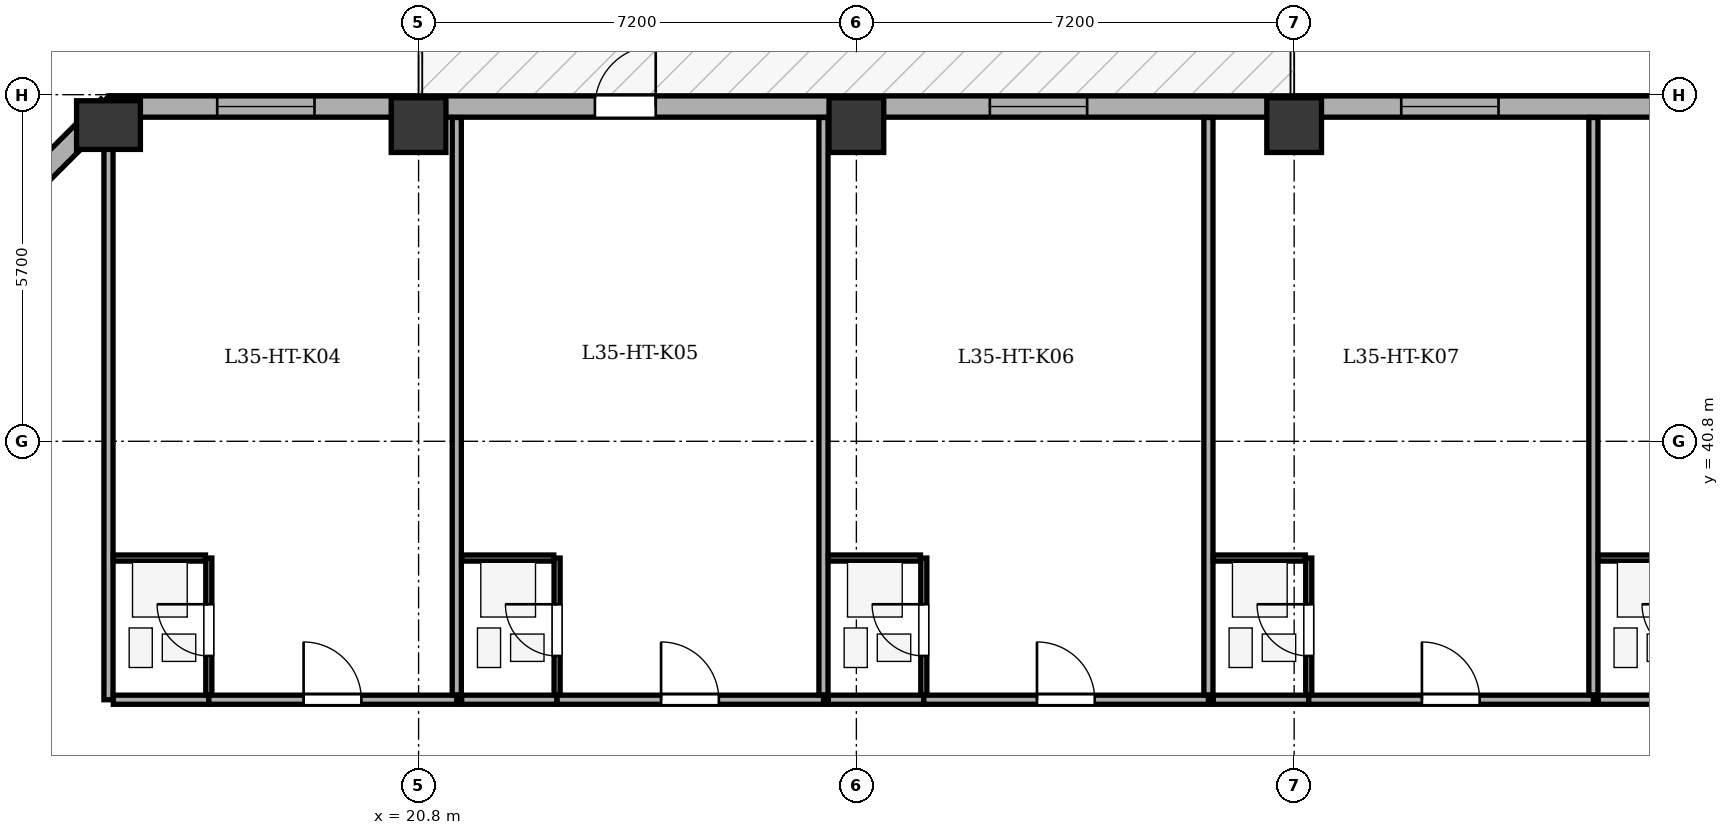
"""IFC4 building model, lengths in metres.
Left out: names, types, materials, properties, quantities, classifications, styles, units other than length and angle.
Written with IfcOpenShell. Run it as: python <this file> out.ifc"""

import sys

from ifc_helpers import new_model, si_unit, direction, frame, frame_2d, origin, origin_2d, place, context, subcontext, project, spatial, rectangle, extrude, element, fill, save


model = new_model("IFC4")
c1 = context("Model", 3, precision=1e-05, world=origin(), true_north=direction((0.0, 1.0)))
c2 = subcontext(c1, "Body", "Model", "MODEL_VIEW")
j1 = project(units=[si_unit("LENGTHUNIT", "METRE"), si_unit("PLANEANGLEUNIT", "RADIAN")], contexts=[c1])
p1 = place(None, origin())
s1 = spatial("IfcSite", under=j1, at=p1, CompositionType="ELEMENT")
p2 = place(p1, origin())
s2 = spatial("IfcBuilding", under=s1, at=p2, CompositionType="ELEMENT")
p3 = place(p2, frame((0.0, 0.0, 141.3)))
s3 = spatial("IfcBuildingStorey", under=s2, at=p3, CompositionType="ELEMENT", Elevation=141.3)
p4 = place(p3, frame((15.7, 46.0, 0.0), z_axis=(0.0, 0.0, 1.0), x_axis=(1.0, 0.0, 0.0)))
e1 = element("IfcColumn", 1, at=p4, inside=s3, PredefinedType="COLUMN", context=c2, shape_type="SweptSolid", body=[
    extrude(rectangle(XDim=0.8, YDim=1.05, at=origin_2d()), origin(), (0.0, 0.0, 1.0), 3.5),
])
for number, where, z_axis, x_axis in (
    (2, (20.8, 46.0, 0.0), (0.0, 0.0, 1.0), (1.0, 0.0, 0.0)),
    (3, (28.0, 46.0, 0.0), (0.0, 0.0, 1.0), (1.0, 0.0, 0.0)),
    (4, (35.2, 46.0, 0.0), (0.0, 0.0, 1.0), (1.0, 0.0, 0.0)),
):
    element("IfcColumn", number, at=place(p3, frame(where, z_axis=z_axis, x_axis=x_axis)), inside=s3, PredefinedType="COLUMN", context=c2, shape_type="SweptSolid", body=[
        extrude(rectangle(XDim=0.9, YDim=0.9, at=origin_2d()), origin(), (0.0, 0.0, 1.0), 3.5),
    ])
p5 = place(p3, frame((10.895, 41.5, 0.0), z_axis=(0.0, 0.0, 1.0), x_axis=(0.707106781187, 0.707106781187, 0.0)))
e5 = element("IfcWall", 5, at=p5, inside=s3, PredefinedType="STANDARD", context=c2, shape_type="SweptSolid", body=[
    extrude(rectangle(XDim=6.795, YDim=0.35, at=frame_2d((3.397, 0.0))), origin(), (0.0, 0.0, 1.0), 2.785),
])
p6 = place(p5, frame((2.698, 0.0, 0.75)))
e6 = element("IfcOpeningElement", 6, at=p6, cuts=e5, PredefinedType="OPENING", context=c2, shape_type="SweptSolid", body=[
    extrude(rectangle(XDim=1.4, YDim=1.65, at=frame_2d((0.7, 0.825))), frame((0.0, 0.185, 0.0), z_axis=(0.0, -1.0, 0.0), x_axis=(1.0, 0.0, 0.0)), (0.0, 0.0, 1.0), 0.37),
])
p7 = place(p3, frame((15.7, 46.305, 0.0), z_axis=(0.0, 0.0, 1.0), x_axis=(1.0, 0.0, 0.0)))
e7 = element("IfcWall", 7, at=p7, inside=s3, PredefinedType="STANDARD", context=c2, shape_type="SweptSolid", body=[
    extrude(rectangle(XDim=35.0, YDim=0.35, at=frame_2d((17.5, 0.0))), origin(), (0.0, 0.0, 1.0), 2.785),
])
p8 = place(p7, frame((8.0, 0.0, 0.0)))
e8 = element("IfcOpeningElement", 8, at=p8, cuts=e7, PredefinedType="OPENING", context=c2, shape_type="SweptSolid", body=[
    extrude(rectangle(XDim=1.0, YDim=2.02, at=frame_2d((0.5, 1.01))), frame((0.0, 0.185, 0.0), z_axis=(0.0, -1.0, 0.0), x_axis=(1.0, 0.0, 0.0)), (0.0, 0.0, 1.0), 0.37),
])
p9 = place(p7, frame((1.788, 0.0, 0.75)))
e9 = element("IfcOpeningElement", 9, at=p9, cuts=e7, PredefinedType="OPENING", context=c2, shape_type="SweptSolid", body=[
    extrude(rectangle(XDim=1.6, YDim=1.75, at=frame_2d((0.8, 0.875))), frame((0.0, 0.185, 0.0), z_axis=(0.0, -1.0, 0.0), x_axis=(1.0, 0.0, 0.0)), (0.0, 0.0, 1.0), 0.37),
])
p10 = place(p7, frame((14.495, 0.0, 0.75)))
e10 = element("IfcOpeningElement", 10, at=p10, cuts=e7, PredefinedType="OPENING", context=c2, shape_type="SweptSolid", body=[
    extrude(rectangle(XDim=1.6, YDim=1.75, at=frame_2d((0.8, 0.875))), frame((0.0, 0.185, 0.0), z_axis=(0.0, -1.0, 0.0), x_axis=(1.0, 0.0, 0.0)), (0.0, 0.0, 1.0), 0.37),
])
p11 = place(p7, frame((21.261, 0.0, 0.75)))
e11 = element("IfcOpeningElement", 11, at=p11, cuts=e7, PredefinedType="OPENING", context=c2, shape_type="SweptSolid", body=[
    extrude(rectangle(XDim=1.6, YDim=1.75, at=frame_2d((0.8, 0.875))), frame((0.0, 0.185, 0.0), z_axis=(0.0, -1.0, 0.0), x_axis=(1.0, 0.0, 0.0)), (0.0, 0.0, 1.0), 0.37),
])
p12 = place(p7, frame((26.486, 0.0, 0.75)))
e12 = element("IfcOpeningElement", 12, at=p12, cuts=e7, PredefinedType="OPENING", context=c2, shape_type="SweptSolid", body=[
    extrude(rectangle(XDim=1.6, YDim=1.75, at=frame_2d((0.8, 0.875))), frame((0.0, 0.185, 0.0), z_axis=(0.0, -1.0, 0.0), x_axis=(1.0, 0.0, 0.0)), (0.0, 0.0, 1.0), 0.37),
])
p13 = place(p7, frame((31.637, 0.0, 0.75)))
e13 = element("IfcOpeningElement", 13, at=p13, cuts=e7, PredefinedType="OPENING", context=c2, shape_type="SweptSolid", body=[
    extrude(rectangle(XDim=1.6, YDim=1.75, at=frame_2d((0.8, 0.875))), frame((0.0, 0.185, 0.0), z_axis=(0.0, -1.0, 0.0), x_axis=(1.0, 0.0, 0.0)), (0.0, 0.0, 1.0), 0.37),
])
p14 = place(p3, frame((15.7, 36.55, 0.0), z_axis=(0.0, 0.0, 1.0), x_axis=(0.0, 1.0, 0.0)))
e14 = element("IfcWall", 14, at=p14, inside=s3, PredefinedType="PARTITIONING", context=c2, shape_type="SweptSolid", body=[
    extrude(rectangle(XDim=9.575, YDim=0.15, at=frame_2d((4.788, 0.0))), origin(), (0.0, 0.0, 1.0), 3.2),
])
p15 = place(p3, frame((15.78, 36.55, 0.0), z_axis=(0.0, 0.0, 1.0), x_axis=(1.0, 0.0, 0.0)))
e15 = element("IfcWall", 15, at=p15, inside=s3, PredefinedType="PARTITIONING", context=c2, shape_type="SweptSolid", body=[
    extrude(rectangle(XDim=1.57, YDim=0.15, at=frame_2d((0.785, 0.0))), origin(), (0.0, 0.0, 1.0), 3.2),
])
p16 = place(p3, frame((17.35, 36.55, 0.0), z_axis=(0.0, 0.0, 1.0), x_axis=(1.0, 0.0, 0.0)))
e16 = element("IfcWall", 16, at=p16, inside=s3, PredefinedType="PARTITIONING", context=c2, shape_type="SweptSolid", body=[
    extrude(rectangle(XDim=4.078, YDim=0.15, at=frame_2d((2.039, 0.0))), origin(), (0.0, 0.0, 1.0), 3.2),
])
p17 = place(p16, frame((1.559, 0.0, 0.0)))
e17 = element("IfcOpeningElement", 17, at=p17, cuts=e16, PredefinedType="OPENING", context=c2, shape_type="SweptSolid", body=[
    extrude(rectangle(XDim=0.95, YDim=2.1, at=frame_2d((0.475, 1.05))), frame((0.0, 0.085, 0.0), z_axis=(0.0, -1.0, 0.0), x_axis=(1.0, 0.0, 0.0)), (0.0, 0.0, 1.0), 0.17),
])
p18 = place(p3, frame((17.35, 36.63, 0.0), z_axis=(0.0, 0.0, 1.0), x_axis=(0.0, 1.0, 0.0)))
e18 = element("IfcWall", 18, at=p18, inside=s3, PredefinedType="PARTITIONING", context=c2, shape_type="SweptSolid", body=[
    extrude(rectangle(XDim=2.25, YDim=0.1, at=frame_2d((1.125, 0.0))), origin(), (0.0, 0.0, 1.0), 3.2),
])
p19 = place(p18, frame((0.64, 0.0, 0.0)))
e19 = element("IfcOpeningElement", 19, at=p19, cuts=e18, PredefinedType="OPENING", context=c2, shape_type="SweptSolid", body=[
    extrude(rectangle(XDim=0.85, YDim=2.05, at=frame_2d((0.425, 1.025))), frame((0.0, 0.06, 0.0), z_axis=(0.0, -1.0, 0.0), x_axis=(1.0, 0.0, 0.0)), (0.0, 0.0, 1.0), 0.12),
])
p20 = place(p3, frame((15.78, 38.88, 0.0), z_axis=(0.0, 0.0, 1.0), x_axis=(1.0, 0.0, 0.0)))
e20 = element("IfcWall", 20, at=p20, inside=s3, PredefinedType="PARTITIONING", context=c2, shape_type="SweptSolid", body=[
    extrude(rectangle(XDim=1.515, YDim=0.1, at=frame_2d((0.757, 0.0))), origin(), (0.0, 0.0, 1.0), 3.2),
])
p21 = place(p3, frame((21.428, 36.63, 0.0), z_axis=(0.0, 0.0, 1.0), x_axis=(0.0, 1.0, 0.0)))
e21 = element("IfcWall", 21, at=p21, inside=s3, PredefinedType="PARTITIONING", context=c2, shape_type="SweptSolid", body=[
    extrude(rectangle(XDim=9.495, YDim=0.15, at=frame_2d((4.748, 0.0))), origin(), (0.0, 0.0, 1.0), 3.2),
])
p22 = place(p3, frame((21.508, 36.55, 0.0), z_axis=(0.0, 0.0, 1.0), x_axis=(1.0, 0.0, 0.0)))
e22 = element("IfcWall", 22, at=p22, inside=s3, PredefinedType="PARTITIONING", context=c2, shape_type="SweptSolid", body=[
    extrude(rectangle(XDim=1.57, YDim=0.15, at=frame_2d((0.785, 0.0))), origin(), (0.0, 0.0, 1.0), 3.2),
])
p23 = place(p3, frame((23.078, 36.55, 0.0), z_axis=(0.0, 0.0, 1.0), x_axis=(1.0, 0.0, 0.0)))
e23 = element("IfcWall", 23, at=p23, inside=s3, PredefinedType="PARTITIONING", context=c2, shape_type="SweptSolid", body=[
    extrude(rectangle(XDim=4.381, YDim=0.15, at=frame_2d((2.19, 0.0))), origin(), (0.0, 0.0, 1.0), 3.2),
])
p24 = place(p23, frame((1.71, 0.0, 0.0)))
e24 = element("IfcOpeningElement", 24, at=p24, cuts=e23, PredefinedType="OPENING", context=c2, shape_type="SweptSolid", body=[
    extrude(rectangle(XDim=0.95, YDim=2.1, at=frame_2d((0.475, 1.05))), frame((0.0, 0.085, 0.0), z_axis=(0.0, -1.0, 0.0), x_axis=(1.0, 0.0, 0.0)), (0.0, 0.0, 1.0), 0.17),
])
p25 = place(p3, frame((23.078, 36.63, 0.0), z_axis=(0.0, 0.0, 1.0), x_axis=(0.0, 1.0, 0.0)))
e25 = element("IfcWall", 25, at=p25, inside=s3, PredefinedType="PARTITIONING", context=c2, shape_type="SweptSolid", body=[
    extrude(rectangle(XDim=2.25, YDim=0.1, at=frame_2d((1.125, 0.0))), origin(), (0.0, 0.0, 1.0), 3.2),
])
p26 = place(p25, frame((0.64, 0.0, 0.0)))
e26 = element("IfcOpeningElement", 26, at=p26, cuts=e25, PredefinedType="OPENING", context=c2, shape_type="SweptSolid", body=[
    extrude(rectangle(XDim=0.85, YDim=2.05, at=frame_2d((0.425, 1.025))), frame((0.0, 0.06, 0.0), z_axis=(0.0, -1.0, 0.0), x_axis=(1.0, 0.0, 0.0)), (0.0, 0.0, 1.0), 0.12),
])
p27 = place(p3, frame((21.508, 38.88, 0.0), z_axis=(0.0, 0.0, 1.0), x_axis=(1.0, 0.0, 0.0)))
e27 = element("IfcWall", 27, at=p27, inside=s3, PredefinedType="PARTITIONING", context=c2, shape_type="SweptSolid", body=[
    extrude(rectangle(XDim=1.515, YDim=0.1, at=frame_2d((0.757, 0.0))), origin(), (0.0, 0.0, 1.0), 3.2),
])
p28 = place(p3, frame((27.459, 36.63, 0.0), z_axis=(0.0, 0.0, 1.0), x_axis=(0.0, 1.0, 0.0)))
e28 = element("IfcWall", 28, at=p28, inside=s3, PredefinedType="PARTITIONING", context=c2, shape_type="SweptSolid", body=[
    extrude(rectangle(XDim=9.495, YDim=0.15, at=frame_2d((4.748, 0.0))), origin(), (0.0, 0.0, 1.0), 3.2),
])
p29 = place(p3, frame((27.539, 36.55, 0.0), z_axis=(0.0, 0.0, 1.0), x_axis=(1.0, 0.0, 0.0)))
e29 = element("IfcWall", 29, at=p29, inside=s3, PredefinedType="PARTITIONING", context=c2, shape_type="SweptSolid", body=[
    extrude(rectangle(XDim=1.57, YDim=0.15, at=frame_2d((0.785, 0.0))), origin(), (0.0, 0.0, 1.0), 3.2),
])
p30 = place(p3, frame((29.109, 36.55, 0.0), z_axis=(0.0, 0.0, 1.0), x_axis=(1.0, 0.0, 0.0)))
e30 = element("IfcWall", 30, at=p30, inside=s3, PredefinedType="PARTITIONING", context=c2, shape_type="SweptSolid", body=[
    extrude(rectangle(XDim=4.681, YDim=0.15, at=frame_2d((2.341, 0.0))), origin(), (0.0, 0.0, 1.0), 3.2),
])
p31 = place(p30, frame((1.861, 0.0, 0.0)))
e31 = element("IfcOpeningElement", 31, at=p31, cuts=e30, PredefinedType="OPENING", context=c2, shape_type="SweptSolid", body=[
    extrude(rectangle(XDim=0.95, YDim=2.1, at=frame_2d((0.475, 1.05))), frame((0.0, 0.085, 0.0), z_axis=(0.0, -1.0, 0.0), x_axis=(1.0, 0.0, 0.0)), (0.0, 0.0, 1.0), 0.17),
])
p32 = place(p3, frame((29.109, 36.63, 0.0), z_axis=(0.0, 0.0, 1.0), x_axis=(0.0, 1.0, 0.0)))
e32 = element("IfcWall", 32, at=p32, inside=s3, PredefinedType="PARTITIONING", context=c2, shape_type="SweptSolid", body=[
    extrude(rectangle(XDim=2.25, YDim=0.1, at=frame_2d((1.125, 0.0))), origin(), (0.0, 0.0, 1.0), 3.2),
])
p33 = place(p32, frame((0.64, 0.0, 0.0)))
e33 = element("IfcOpeningElement", 33, at=p33, cuts=e32, PredefinedType="OPENING", context=c2, shape_type="SweptSolid", body=[
    extrude(rectangle(XDim=0.85, YDim=2.05, at=frame_2d((0.425, 1.025))), frame((0.0, 0.06, 0.0), z_axis=(0.0, -1.0, 0.0), x_axis=(1.0, 0.0, 0.0)), (0.0, 0.0, 1.0), 0.12),
])
p34 = place(p3, frame((27.539, 38.88, 0.0), z_axis=(0.0, 0.0, 1.0), x_axis=(1.0, 0.0, 0.0)))
e34 = element("IfcWall", 34, at=p34, inside=s3, PredefinedType="PARTITIONING", context=c2, shape_type="SweptSolid", body=[
    extrude(rectangle(XDim=1.515, YDim=0.1, at=frame_2d((0.757, 0.0))), origin(), (0.0, 0.0, 1.0), 3.2),
])
p35 = place(p3, frame((33.79, 36.63, 0.0), z_axis=(0.0, 0.0, 1.0), x_axis=(0.0, 1.0, 0.0)))
e35 = element("IfcWall", 35, at=p35, inside=s3, PredefinedType="PARTITIONING", context=c2, shape_type="SweptSolid", body=[
    extrude(rectangle(XDim=9.495, YDim=0.15, at=frame_2d((4.748, 0.0))), origin(), (0.0, 0.0, 1.0), 2.785),
])
p36 = place(p3, frame((33.87, 36.55, 0.0), z_axis=(0.0, 0.0, 1.0), x_axis=(1.0, 0.0, 0.0)))
e36 = element("IfcWall", 36, at=p36, inside=s3, PredefinedType="PARTITIONING", context=c2, shape_type="SweptSolid", body=[
    extrude(rectangle(XDim=1.57, YDim=0.15, at=frame_2d((0.785, 0.0))), origin(), (0.0, 0.0, 1.0), 3.2),
])
p37 = place(p3, frame((35.44, 36.55, 0.0), z_axis=(0.0, 0.0, 1.0), x_axis=(1.0, 0.0, 0.0)))
e37 = element("IfcWall", 37, at=p37, inside=s3, PredefinedType="PARTITIONING", context=c2, shape_type="SweptSolid", body=[
    extrude(rectangle(XDim=4.681, YDim=0.15, at=frame_2d((2.341, 0.0))), origin(), (0.0, 0.0, 1.0), 3.2),
])
p38 = place(p37, frame((1.861, 0.0, 0.0)))
e38 = element("IfcOpeningElement", 38, at=p38, cuts=e37, PredefinedType="OPENING", context=c2, shape_type="SweptSolid", body=[
    extrude(rectangle(XDim=0.95, YDim=2.1, at=frame_2d((0.475, 1.05))), frame((0.0, 0.085, 0.0), z_axis=(0.0, -1.0, 0.0), x_axis=(1.0, 0.0, 0.0)), (0.0, 0.0, 1.0), 0.17),
])
p39 = place(p3, frame((35.44, 36.63, 0.0), z_axis=(0.0, 0.0, 1.0), x_axis=(0.0, 1.0, 0.0)))
e39 = element("IfcWall", 39, at=p39, inside=s3, PredefinedType="PARTITIONING", context=c2, shape_type="SweptSolid", body=[
    extrude(rectangle(XDim=2.25, YDim=0.1, at=frame_2d((1.125, 0.0))), origin(), (0.0, 0.0, 1.0), 2.535),
])
p40 = place(p39, frame((0.64, 0.0, 0.0)))
e40 = element("IfcOpeningElement", 40, at=p40, cuts=e39, PredefinedType="OPENING", context=c2, shape_type="SweptSolid", body=[
    extrude(rectangle(XDim=0.85, YDim=2.05, at=frame_2d((0.425, 1.025))), frame((0.0, 0.06, 0.0), z_axis=(0.0, -1.0, 0.0), x_axis=(1.0, 0.0, 0.0)), (0.0, 0.0, 1.0), 0.12),
])
p41 = place(p3, frame((33.87, 38.88, 0.0), z_axis=(0.0, 0.0, 1.0), x_axis=(1.0, 0.0, 0.0)))
e41 = element("IfcWall", 41, at=p41, inside=s3, PredefinedType="PARTITIONING", context=c2, shape_type="SweptSolid", body=[
    extrude(rectangle(XDim=1.515, YDim=0.1, at=frame_2d((0.757, 0.0))), origin(), (0.0, 0.0, 1.0), 3.2),
])
p42 = place(p3, frame((40.121, 36.63, 0.0), z_axis=(0.0, 0.0, 1.0), x_axis=(0.0, 1.0, 0.0)))
e42 = element("IfcWall", 42, at=p42, inside=s3, PredefinedType="PARTITIONING", context=c2, shape_type="SweptSolid", body=[
    extrude(rectangle(XDim=9.495, YDim=0.15, at=frame_2d((4.748, 0.0))), origin(), (0.0, 0.0, 1.0), 3.2),
])
p43 = place(p3, frame((40.201, 36.55, 0.0), z_axis=(0.0, 0.0, 1.0), x_axis=(1.0, 0.0, 0.0)))
e43 = element("IfcWall", 43, at=p43, inside=s3, PredefinedType="PARTITIONING", context=c2, shape_type="SweptSolid", body=[
    extrude(rectangle(XDim=1.57, YDim=0.15, at=frame_2d((0.785, 0.0))), origin(), (0.0, 0.0, 1.0), 3.2),
])
p44 = place(p3, frame((40.201, 38.88, 0.0), z_axis=(0.0, 0.0, 1.0), x_axis=(1.0, 0.0, 0.0)))
e44 = element("IfcWall", 44, at=p44, inside=s3, PredefinedType="PARTITIONING", context=c2, shape_type="SweptSolid", body=[
    extrude(rectangle(XDim=1.515, YDim=0.1, at=frame_2d((0.758, 0.0))), origin(), (0.0, 0.0, 1.0), 3.2),
])
p45 = place(p8, origin())
e45 = element("IfcDoor", 45, at=p45, inside=s3, OperationType="SINGLE_SWING_RIGHT", PredefinedType="DOOR", context=c2, shape_type="SweptSolid", body=[
    extrude(rectangle(XDim=1.0, YDim=2.02, at=frame_2d((0.5, 1.01))), frame((0.0, 0.025, 0.0), z_axis=(0.0, -1.0, 0.0), x_axis=(1.0, 0.0, 0.0)), (0.0, 0.0, 1.0), 0.05),
])
fill(e8, e45)
p46 = place(p9, origin())
e46 = element("IfcWindow", 46, at=p46, inside=s3, PartitioningType="SINGLE_PANEL", PredefinedType="WINDOW", context=c2, shape_type="SweptSolid", body=[
    extrude(rectangle(XDim=1.6, YDim=1.75, at=frame_2d((0.8, 0.875))), frame((0.0, -0.01, 0.0), z_axis=(0.0, -1.0, 0.0), x_axis=(1.0, 0.0, 0.0)), (0.0, 0.0, 1.0), 0.06),
])
fill(e9, e46)
p47 = place(p10, origin())
e47 = element("IfcWindow", 47, at=p47, inside=s3, PartitioningType="SINGLE_PANEL", PredefinedType="WINDOW", context=c2, shape_type="SweptSolid", body=[
    extrude(rectangle(XDim=1.6, YDim=1.75, at=frame_2d((0.8, 0.875))), frame((0.0, -0.01, 0.0), z_axis=(0.0, -1.0, 0.0), x_axis=(1.0, 0.0, 0.0)), (0.0, 0.0, 1.0), 0.06),
])
fill(e10, e47)
p48 = place(p11, origin())
e48 = element("IfcWindow", 48, at=p48, inside=s3, PartitioningType="SINGLE_PANEL", PredefinedType="WINDOW", context=c2, shape_type="SweptSolid", body=[
    extrude(rectangle(XDim=1.6, YDim=1.75, at=frame_2d((0.8, 0.875))), frame((0.0, -0.01, 0.0), z_axis=(0.0, -1.0, 0.0), x_axis=(1.0, 0.0, 0.0)), (0.0, 0.0, 1.0), 0.06),
])
fill(e11, e48)
p49 = place(p19, origin())
e49 = element("IfcDoor", 49, at=p49, inside=s3, OperationType="SINGLE_SWING_RIGHT", PredefinedType="DOOR", context=c2, shape_type="SweptSolid", body=[
    extrude(rectangle(XDim=0.85, YDim=2.05, at=frame_2d((0.425, 1.025))), frame((0.0, 0.025, 0.0), z_axis=(0.0, -1.0, 0.0), x_axis=(1.0, 0.0, 0.0)), (0.0, 0.0, 1.0), 0.05),
])
fill(e19, e49)
p50 = place(p17, origin())
e50 = element("IfcDoor", 50, at=p50, inside=s3, OperationType="SINGLE_SWING_LEFT", PredefinedType="DOOR", context=c2, shape_type="SweptSolid", body=[
    extrude(rectangle(XDim=0.95, YDim=2.1, at=frame_2d((0.475, 1.05))), frame((0.0, 0.025, 0.0), z_axis=(0.0, -1.0, 0.0), x_axis=(1.0, 0.0, 0.0)), (0.0, 0.0, 1.0), 0.05),
])
fill(e17, e50)
p51 = place(p26, origin())
e51 = element("IfcDoor", 51, at=p51, inside=s3, OperationType="SINGLE_SWING_RIGHT", PredefinedType="DOOR", context=c2, shape_type="SweptSolid", body=[
    extrude(rectangle(XDim=0.85, YDim=2.05, at=frame_2d((0.425, 1.025))), frame((0.0, 0.025, 0.0), z_axis=(0.0, -1.0, 0.0), x_axis=(1.0, 0.0, 0.0)), (0.0, 0.0, 1.0), 0.05),
])
fill(e26, e51)
p52 = place(p24, origin())
e52 = element("IfcDoor", 52, at=p52, inside=s3, OperationType="SINGLE_SWING_LEFT", PredefinedType="DOOR", context=c2, shape_type="SweptSolid", body=[
    extrude(rectangle(XDim=0.95, YDim=2.1, at=frame_2d((0.475, 1.05))), frame((0.0, 0.025, 0.0), z_axis=(0.0, -1.0, 0.0), x_axis=(1.0, 0.0, 0.0)), (0.0, 0.0, 1.0), 0.05),
])
fill(e24, e52)
p53 = place(p33, origin())
e53 = element("IfcDoor", 53, at=p53, inside=s3, OperationType="SINGLE_SWING_RIGHT", PredefinedType="DOOR", context=c2, shape_type="SweptSolid", body=[
    extrude(rectangle(XDim=0.85, YDim=2.05, at=frame_2d((0.425, 1.025))), frame((0.0, 0.025, 0.0), z_axis=(0.0, -1.0, 0.0), x_axis=(1.0, 0.0, 0.0)), (0.0, 0.0, 1.0), 0.05),
])
fill(e33, e53)
p54 = place(p31, origin())
e54 = element("IfcDoor", 54, at=p54, inside=s3, OperationType="SINGLE_SWING_LEFT", PredefinedType="DOOR", context=c2, shape_type="SweptSolid", body=[
    extrude(rectangle(XDim=0.95, YDim=2.1, at=frame_2d((0.475, 1.05))), frame((0.0, 0.025, 0.0), z_axis=(0.0, -1.0, 0.0), x_axis=(1.0, 0.0, 0.0)), (0.0, 0.0, 1.0), 0.05),
])
fill(e31, e54)
p55 = place(p40, origin())
e55 = element("IfcDoor", 55, at=p55, inside=s3, OperationType="SINGLE_SWING_RIGHT", PredefinedType="DOOR", context=c2, shape_type="SweptSolid", body=[
    extrude(rectangle(XDim=0.85, YDim=2.05, at=frame_2d((0.425, 1.025))), frame((0.0, 0.025, 0.0), z_axis=(0.0, -1.0, 0.0), x_axis=(1.0, 0.0, 0.0)), (0.0, 0.0, 1.0), 0.05),
])
fill(e40, e55)
p56 = place(p38, origin())
e56 = element("IfcDoor", 56, at=p56, inside=s3, OperationType="SINGLE_SWING_LEFT", PredefinedType="DOOR", context=c2, shape_type="SweptSolid", body=[
    extrude(rectangle(XDim=0.95, YDim=2.1, at=frame_2d((0.475, 1.05))), frame((0.0, 0.025, 0.0), z_axis=(0.0, -1.0, 0.0), x_axis=(1.0, 0.0, 0.0)), (0.0, 0.0, 1.0), 0.05),
])
fill(e38, e56)
save(model, sys.argv[1])
